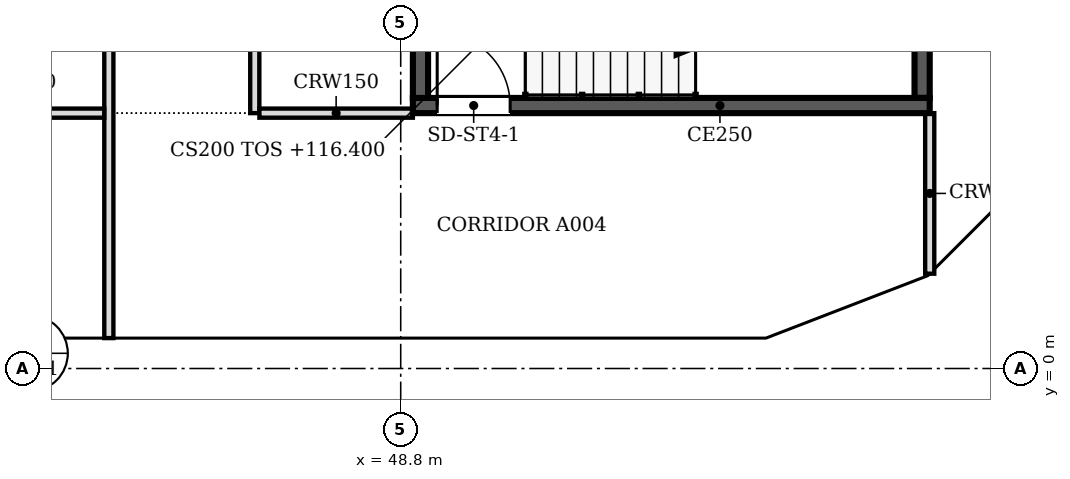
"""IFC4 building model, lengths in metres.
Left out: names, types, materials, properties, quantities, classifications, styles, units other than length and angle.
Written with IfcOpenShell. Run it as: python <this file> out.ifc"""

import sys

from ifc_helpers import new_model, si_unit, direction, frame, frame_2d, origin, place, context, subcontext, project, spatial, polyline, rectangle, outline, extrude, faceted_brep, source, transform, mapped, element, fill, save


model = new_model("IFC4")
c1 = context("Model", 3, precision=1e-05, world=origin(), true_north=direction((0.0, 1.0)))
c2 = subcontext(c1, "Body", "Model", "MODEL_VIEW")
j1 = project(units=[si_unit("LENGTHUNIT", "METRE"), si_unit("PLANEANGLEUNIT", "RADIAN")], contexts=[c1])
p1 = place(None, origin())
s1 = spatial("IfcSite", under=j1, at=p1, CompositionType="ELEMENT")
p2 = place(p1, origin())
s2 = spatial("IfcBuilding", under=s1, at=p2, CompositionType="ELEMENT")
p3 = place(p2, frame((0.0, 0.0, 116.4)))
s3 = spatial("IfcBuildingStorey", under=s2, at=p3, CompositionType="ELEMENT", Elevation=116.4)
m1 = source(origin(), c2, "Body", "SweptSolid", [
    extrude(outline(polyline([(3.05, 0.0), (6.1, 3.8), (3.05, 7.6), (0.0, 3.8), (3.05, 0.0)])), frame((0.0, 0.25, 0.0), z_axis=(0.0, -1.0, 0.0), x_axis=(1.0, 0.0, 0.0)), (0.0, 0.0, 1.0), 0.5),
])
p4 = place(p3, frame((42.7, 0.25, -3.8), z_axis=(0.0, 0.0, 1.0), x_axis=(1.0, 0.0, 0.0)))
e1 = element("IfcWall", 1, at=p4, inside=s3, PredefinedType="SOLIDWALL", context=c2, shape_type="MappedRepresentation", body=[
    mapped(m1, transform((0.0, 0.0, 0.0), scale=1.0)),
])
m2 = source(origin(), c2, "Body", "SweptSolid", [
    extrude(outline(polyline([(3.05, 0.399), (5.78, 3.8), (3.05, 7.2), (0.321, 3.8), (3.05, 0.399)])), frame((0.0, 0.26, 0.0), z_axis=(0.0, -1.0, 0.0), x_axis=(1.0, 0.0, 0.0)), (0.0, 0.0, 1.0), 0.52),
])
p5 = place(p4, origin())
e2 = element("IfcOpeningElement", 2, at=p5, cuts=e1, PredefinedType="OPENING", context=c2, shape_type="MappedRepresentation", body=[
    mapped(m2, transform((0.0, 0.0, 0.0), scale=1.0)),
])
m3 = source(origin(), c2, "Body", "Brep", [
    faceted_brep([(3.05, -0.25, 0.0), (6.053, -0.25, 3.8), (3.05, -0.25, 7.6), (0.0, -0.25, 3.8), (0.0, 0.25, 3.8), (3.05, 0.25, 7.6), (6.007, 0.25, 3.859), (6.007, 0.25, 3.741), (3.05, 0.25, 0.0), (6.053, 0.0, 3.8)], [[[0, 1, 2, 3]], [[4, 5, 6, 7, 8]], [[8, 7, 9, 1, 0]], [[6, 5, 2, 1, 9]], [[5, 4, 3, 2]], [[4, 8, 0, 3]], [[9, 7, 6]]]),
])
p6 = place(p3, frame((48.8, 0.25, -3.8), z_axis=(0.0, 0.0, 1.0), x_axis=(1.0, 0.0, 0.0)))
e3 = element("IfcWall", 3, at=p6, inside=s3, PredefinedType="SOLIDWALL", context=c2, shape_type="MappedRepresentation", body=[
    mapped(m3, transform((0.0, 0.0, 0.0), scale=1.0)),
])
m4 = source(origin(), c2, "Body", "SweptSolid", [
    extrude(outline(polyline([(3.049, 0.401), (5.735, 3.8), (3.049, 7.199), (0.321, 3.8), (3.049, 0.401)])), frame((0.0, 0.26, 0.0), z_axis=(0.0, -1.0, 0.0), x_axis=(1.0, 0.0, 0.0)), (0.0, 0.0, 1.0), 0.52),
])
p7 = place(p6, origin())
e4 = element("IfcOpeningElement", 4, at=p7, cuts=e3, PredefinedType="OPENING", context=c2, shape_type="MappedRepresentation", body=[
    mapped(m4, transform((0.0, 0.0, 0.0), scale=1.0)),
])
m5 = source(origin(), c2, "Body", "Brep", [
    faceted_brep([(2.95, -0.25, 0.0), (3.003, -0.25, 0.068), (3.003, -0.25, 7.531), (2.95, -0.25, 7.6), (0.0, -0.25, 3.8), (0.047, 0.25, 3.86), (2.898, 0.25, 7.532), (2.898, 0.25, 0.068), (0.047, 0.25, 3.74), (2.95, 0.0, 0.0), (2.95, 0.0, 7.6), (0.0, 0.0, 3.8)], [[[0, 1, 2, 3, 4]], [[5, 6, 7, 8]], [[1, 0, 9]], [[10, 3, 2]], [[6, 5, 11, 4, 3, 10]], [[8, 7, 9, 0, 4, 11]], [[8, 11, 5]], [[1, 9, 7, 6, 10, 2]]]),
])
p8 = place(p3, frame((54.854, 0.25, -3.8), z_axis=(0.0, 0.0, 1.0), x_axis=(0.932970071518, 0.359953949349, 0.0)))
e5 = element("IfcWall", 5, at=p8, inside=s3, PredefinedType="SOLIDWALL", context=c2, shape_type="MappedRepresentation", body=[
    mapped(m5, transform((0.0, 0.0, 0.0), scale=1.0)),
])
m6 = source(origin(), c2, "Body", "SweptSolid", [
    extrude(outline(polyline([(2.75, 6.935), (0.316, 3.8), (2.75, 0.665), (2.75, 6.935)])), frame((0.0, 0.26, 0.0), z_axis=(0.0, -1.0, 0.0), x_axis=(1.0, 0.0, 0.0)), (0.0, 0.0, 1.0), 0.52),
])
p9 = place(p8, origin())
e6 = element("IfcOpeningElement", 6, at=p9, cuts=e5, PredefinedType="OPENING", context=c2, shape_type="MappedRepresentation", body=[
    mapped(m6, transform((0.0, 0.0, 0.0), scale=1.0)),
])
m7 = source(origin(), c2, "Body", "Brep", [
    faceted_brep([(0.053, -0.25, 0.0), (2.997, -0.25, 3.8), (0.053, -0.25, 7.6), (0.0, -0.25, 7.532), (0.0, -0.25, 0.068), (0.106, 0.25, 7.531), (2.944, 0.25, 3.868), (2.944, 0.25, 3.732), (0.106, 0.25, 0.068), (2.997, 0.0, 3.8), (0.053, 0.0, 0.0), (0.053, 0.0, 7.6)], [[[0, 1, 2, 3, 4]], [[5, 6, 7, 8]], [[8, 7, 9, 1, 0, 10]], [[6, 5, 11, 2, 1, 9]], [[3, 2, 11]], [[10, 0, 4]], [[8, 10, 4, 3, 11, 5]], [[9, 7, 6]]]),
])
p10 = place(p3, frame((57.569, 1.274, -3.8), z_axis=(0.0, 0.0, 1.0), x_axis=(0.707066050402, 0.707147509625, 0.0)))
e7 = element("IfcWall", 7, at=p10, inside=s3, PredefinedType="SOLIDWALL", context=c2, shape_type="MappedRepresentation", body=[
    mapped(m7, transform((0.0, 0.0, 0.0), scale=1.0)),
])
m8 = source(origin(), c2, "Body", "SweptSolid", [
    extrude(outline(polyline([(0.253, 0.666), (2.681, 3.8), (0.253, 6.934), (0.253, 0.666)])), frame((0.0, 0.26, 0.0), z_axis=(0.0, -1.0, 0.0), x_axis=(1.0, 0.0, 0.0)), (0.0, 0.0, 1.0), 0.52),
])
p11 = place(p10, origin())
e8 = element("IfcOpeningElement", 8, at=p11, cuts=e7, PredefinedType="OPENING", context=c2, shape_type="MappedRepresentation", body=[
    mapped(m8, transform((0.0, 0.0, 0.0), scale=1.0)),
])
p12 = place(p2, frame((0.0, 0.0, 120.2)))
s4 = spatial("IfcBuildingStorey", under=s2, at=p12, CompositionType="ELEMENT", Elevation=120.2)
m9 = source(origin(), c2, "Body", "SweptSolid", [
    extrude(outline(polyline([(3.05, 0.0), (6.1, 3.8), (3.05, 7.6), (0.0, 3.8), (3.05, 0.0)])), frame((0.0, 0.25, 0.0), z_axis=(0.0, -1.0, 0.0), x_axis=(1.0, 0.0, 0.0)), (0.0, 0.0, 1.0), 0.5),
])
p13 = place(p12, frame((39.65, 0.25, -3.8), z_axis=(0.0, 0.0, 1.0), x_axis=(1.0, 0.0, 0.0)))
e9 = element("IfcWall", 9, at=p13, inside=s4, PredefinedType="SOLIDWALL", context=c2, shape_type="MappedRepresentation", body=[
    mapped(m9, transform((0.0, 0.0, 0.0), scale=1.0)),
])
m10 = source(origin(), c2, "Body", "SweptSolid", [
    extrude(outline(polyline([(3.05, 0.399), (5.78, 3.8), (3.05, 7.201), (0.321, 3.8), (3.05, 0.399)])), frame((0.0, 0.26, 0.0), z_axis=(0.0, -1.0, 0.0), x_axis=(1.0, 0.0, 0.0)), (0.0, 0.0, 1.0), 0.52),
])
p14 = place(p13, origin())
e10 = element("IfcOpeningElement", 10, at=p14, cuts=e9, PredefinedType="OPENING", context=c2, shape_type="MappedRepresentation", body=[
    mapped(m10, transform((0.0, 0.0, 0.0), scale=1.0)),
])
p15 = place(p12, frame((45.75, 0.25, -3.8), z_axis=(0.0, 0.0, 1.0), x_axis=(1.0, 0.0, 0.0)))
e11 = element("IfcWall", 11, at=p15, inside=s4, PredefinedType="SOLIDWALL", context=c2, shape_type="MappedRepresentation", body=[
    mapped(m9, transform((0.0, 0.0, 0.0), scale=1.0)),
])
p16 = place(p15, origin())
e12 = element("IfcOpeningElement", 12, at=p16, cuts=e11, PredefinedType="OPENING", context=c2, shape_type="MappedRepresentation", body=[
    mapped(m10, transform((0.0, 0.0, 0.0), scale=1.0)),
])
m11 = source(origin(), c2, "Body", "Brep", [
    faceted_brep([(3.003, -0.25, 0.0), (3.05, -0.25, 0.06), (3.05, -0.25, 7.54), (3.003, -0.25, 7.6), (0.0, -0.25, 3.8), (0.0, 0.25, 3.8), (2.957, 0.25, 7.541), (2.957, 0.25, 0.059), (3.003, 0.0, 0.0), (3.003, 0.0, 7.6)], [[[0, 1, 2, 3, 4]], [[5, 6, 7]], [[1, 0, 8]], [[9, 3, 2]], [[6, 5, 4, 3, 9]], [[5, 7, 8, 0, 4]], [[1, 8, 7, 6, 9, 2]]]),
])
p17 = place(p12, frame((51.85, 0.25, -3.8), z_axis=(0.0, 0.0, 1.0), x_axis=(1.0, 0.0, 0.0)))
e13 = element("IfcWall", 13, at=p17, inside=s4, PredefinedType="SOLIDWALL", context=c2, shape_type="MappedRepresentation", body=[
    mapped(m11, transform((0.0, 0.0, 0.0), scale=1.0)),
])
m12 = source(origin(), c2, "Body", "SweptSolid", [
    extrude(outline(polyline([(2.803, 6.944), (0.319, 3.8), (2.803, 0.656), (2.803, 6.944)])), frame((0.0, 0.26, 0.0), z_axis=(0.0, -1.0, 0.0), x_axis=(1.0, 0.0, 0.0)), (0.0, 0.0, 1.0), 0.52),
])
p18 = place(p17, origin())
e14 = element("IfcOpeningElement", 14, at=p18, cuts=e13, PredefinedType="OPENING", context=c2, shape_type="MappedRepresentation", body=[
    mapped(m12, transform((0.0, 0.0, 0.0), scale=1.0)),
])
m13 = source(origin(), c2, "Body", "Brep", [
    faceted_brep([(0.047, -0.25, 0.0), (2.997, -0.25, 3.8), (0.047, -0.25, 7.6), (0.0, -0.25, 7.541), (0.0, -0.25, 0.059), (0.093, 0.25, 7.54), (2.944, 0.25, 3.868), (2.944, 0.25, 3.732), (0.093, 0.25, 0.06), (2.997, 0.0, 3.8), (0.047, 0.0, 0.0), (0.047, 0.0, 7.6)], [[[0, 1, 2, 3, 4]], [[5, 6, 7, 8]], [[8, 7, 9, 1, 0, 10]], [[6, 5, 11, 2, 1, 9]], [[3, 2, 11]], [[10, 0, 4]], [[8, 10, 4, 3, 11, 5]], [[9, 7, 6]]]),
])
p19 = place(p12, frame((54.81, 0.233, -3.8), z_axis=(0.0, 0.0, 1.0), x_axis=(0.932990326376, 0.359901446078, 0.0)))
e15 = element("IfcWall", 15, at=p19, inside=s4, PredefinedType="SOLIDWALL", context=c2, shape_type="MappedRepresentation", body=[
    mapped(m13, transform((0.0, 0.0, 0.0), scale=1.0)),
])
m14 = source(origin(), c2, "Body", "SweptSolid", [
    extrude(outline(polyline([(0.247, 0.665), (2.681, 3.8), (0.247, 6.935), (0.247, 0.665)])), frame((0.0, 0.26, 0.0), z_axis=(0.0, -1.0, 0.0), x_axis=(1.0, 0.0, 0.0)), (0.0, 0.0, 1.0), 0.52),
])
p20 = place(p19, origin())
e16 = element("IfcOpeningElement", 16, at=p20, cuts=e15, PredefinedType="OPENING", context=c2, shape_type="MappedRepresentation", body=[
    mapped(m14, transform((0.0, 0.0, 0.0), scale=1.0)),
])
m15 = source(origin(), c2, "Body", "Brep", [
    faceted_brep([(2.944, -0.25, 0.0), (2.997, -0.25, 0.068), (2.997, -0.25, 7.532), (2.944, -0.25, 7.6), (0.0, -0.25, 3.8), (0.053, 0.25, 3.868), (2.891, 0.25, 7.532), (2.891, 0.25, 0.068), (0.053, 0.25, 3.732), (2.944, 0.0, 0.0), (2.944, 0.0, 7.6), (0.0, 0.0, 3.8)], [[[0, 1, 2, 3, 4]], [[5, 6, 7, 8]], [[1, 0, 9]], [[10, 3, 2]], [[6, 5, 11, 4, 3, 10]], [[8, 7, 9, 0, 4, 11]], [[8, 11, 5]], [[1, 9, 7, 6, 10, 2]]]),
])
p21 = place(p12, frame((57.606, 1.312, -3.8), z_axis=(0.0, 0.0, 1.0), x_axis=(0.707147509625, 0.707066050402, 0.0)))
e17 = element("IfcWall", 17, at=p21, inside=s4, PredefinedType="SOLIDWALL", context=c2, shape_type="MappedRepresentation", body=[
    mapped(m15, transform((0.0, 0.0, 0.0), scale=1.0)),
])
m16 = source(origin(), c2, "Body", "SweptSolid", [
    extrude(outline(polyline([(2.744, 6.934), (0.316, 3.8), (2.744, 0.667), (2.744, 6.934)])), frame((0.0, 0.26, 0.0), z_axis=(0.0, -1.0, 0.0), x_axis=(1.0, 0.0, 0.0)), (0.0, 0.0, 1.0), 0.52),
])
p22 = place(p21, origin())
e18 = element("IfcOpeningElement", 18, at=p22, cuts=e17, PredefinedType="OPENING", context=c2, shape_type="MappedRepresentation", body=[
    mapped(m16, transform((0.0, 0.0, 0.0), scale=1.0)),
])
p23 = place(p3, frame((57.5, 4.325, 0.0), z_axis=(0.0, 0.0, 1.0), x_axis=(-1.0, 0.0, 0.0)))
e19 = element("IfcWall", 19, at=p23, inside=s3, PredefinedType="SOLIDWALL", context=c2, shape_type="SweptSolid", body=[
    extrude(rectangle(XDim=8.5, YDim=0.25, at=frame_2d((4.25, 0.0))), origin(), (0.0, 0.0, 1.0), 3.8),
])
m17 = source(origin(), c2, "Body", "SweptSolid", [
    extrude(rectangle(XDim=1.2, YDim=2.1, at=frame_2d((0.6, 1.05))), frame((0.0, 0.135, 0.0), z_axis=(0.0, -1.0, 0.0), x_axis=(1.0, 0.0, 0.0)), (0.0, 0.0, 1.0), 0.27),
])
p24 = place(p23, frame((6.9, 0.0, 0.0)))
e20 = element("IfcOpeningElement", 20, at=p24, cuts=e19, PredefinedType="OPENING", context=c2, shape_type="MappedRepresentation", body=[
    mapped(m17, transform((0.0, 0.0, 0.0), scale=1.0)),
])
for number, where, z_axis, x_axis in (
    (21, (49.125, 4.45, 0.0), (0.0, 0.0, 1.0), (0.0, 1.0, 0.0)),
    (22, (57.375, 7.85, 0.0), (0.0, 0.0, 1.0), (0.0, -1.0, 0.0)),
):
    element("IfcWall", number, at=place(p3, frame(where, z_axis=z_axis, x_axis=x_axis)), inside=s3, PredefinedType="SOLIDWALL", context=c2, shape_type="SweptSolid", body=[
        extrude(rectangle(XDim=3.4, YDim=0.25, at=frame_2d((1.7, 0.0))), origin(), (0.0, 0.0, 1.0), 3.8),
    ])
p25 = place(p3, frame((44.0, 0.5, 0.0), z_axis=(0.0, 0.0, 1.0), x_axis=(0.0, 1.0, 0.0)))
e23 = element("IfcWall", 23, at=p25, inside=s3, PredefinedType="PARTITIONING", context=c2, shape_type="SweptSolid", body=[
    extrude(rectangle(XDim=21.424, YDim=0.15, at=frame_2d((10.712, 0.0))), origin(), (0.0, 0.0, 1.0), 3.067),
])
m18 = source(origin(), c2, "Body", "SweptSolid", [
    extrude(rectangle(XDim=0.9, YDim=2.1, at=frame_2d((0.45, 1.05))), frame((0.0, 0.085, 0.0), z_axis=(0.0, -1.0, 0.0), x_axis=(1.0, 0.0, 0.0)), (0.0, 0.0, 1.0), 0.17),
])
p26 = place(p25, frame((16.601, 0.0, 0.0)))
e24 = element("IfcOpeningElement", 24, at=p26, cuts=e23, PredefinedType="OPENING", context=c2, shape_type="MappedRepresentation", body=[
    mapped(m18, transform((0.0, 0.0, 0.0), scale=1.0)),
])
m19 = source(origin(), c2, "Body", "SweptSolid", [
    extrude(rectangle(XDim=1.0, YDim=2.1, at=frame_2d((0.5, 1.05))), frame((0.0, 0.085, 0.0), z_axis=(0.0, -1.0, 0.0), x_axis=(1.0, 0.0, 0.0)), (0.0, 0.0, 1.0), 0.17),
])
p27 = place(p25, frame((7.7, 0.0, 0.0)))
e25 = element("IfcOpeningElement", 25, at=p27, cuts=e23, PredefinedType="OPENING", context=c2, shape_type="MappedRepresentation", body=[
    mapped(m19, transform((0.0, 0.0, 0.0), scale=1.0)),
])
p28 = place(p3, frame((57.5, 1.559, 0.0), z_axis=(0.0, 0.0, 1.0), x_axis=(0.0, 1.0, 0.0)))
e26 = element("IfcWall", 26, at=p28, inside=s3, PredefinedType="PARTITIONING", context=c2, shape_type="SweptSolid", body=[
    extrude(rectangle(XDim=2.641, YDim=0.15, at=frame_2d((1.32, 0.0))), origin(), (0.0, 0.0, 1.0), 3.067),
])
p29 = place(p3, frame((40.951, 4.2, 0.0), z_axis=(0.0, 0.0, 1.0), x_axis=(1.0, 0.0, 0.0)))
e27 = element("IfcWall", 27, at=p29, inside=s3, PredefinedType="PARTITIONING", context=c2, shape_type="SweptSolid", body=[
    extrude(rectangle(XDim=2.973, YDim=0.15, at=frame_2d((1.487, 0.0))), origin(), (0.0, 0.0, 1.0), 3.067),
])
p30 = place(p3, frame((46.4, 21.924, 0.0), z_axis=(0.0, 0.0, 1.0), x_axis=(0.0, -1.0, 0.0)))
e28 = element("IfcWall", 28, at=p30, inside=s3, PredefinedType="PARTITIONING", context=c2, shape_type="SweptSolid", body=[
    extrude(rectangle(XDim=17.724, YDim=0.15, at=frame_2d((8.862, 0.0))), origin(), (0.0, 0.0, 1.0), 3.067),
])
p31 = place(p30, frame((3.423, 0.0, 0.0)))
e29 = element("IfcOpeningElement", 29, at=p31, cuts=e28, PredefinedType="OPENING", context=c2, shape_type="MappedRepresentation", body=[
    mapped(m19, transform((0.0, 0.0, 0.0), scale=1.0)),
])
p32 = place(p30, frame((12.324, 0.0, 0.0)))
e30 = element("IfcOpeningElement", 30, at=p32, cuts=e28, PredefinedType="OPENING", context=c2, shape_type="MappedRepresentation", body=[
    mapped(m18, transform((0.0, 0.0, 0.0), scale=1.0)),
])
p33 = place(p3, frame((46.476, 4.2, 0.0), z_axis=(0.0, 0.0, 1.0), x_axis=(1.0, 0.0, 0.0)))
e31 = element("IfcWall", 31, at=p33, inside=s3, PredefinedType="PARTITIONING", context=c2, shape_type="SweptSolid", body=[
    extrude(rectangle(XDim=2.524, YDim=0.15, at=frame_2d((1.262, 0.0))), origin(), (0.0, 0.0, 1.0), 3.067),
])
m20 = source(origin(), c2, "Body", "SweptSolid", [
    extrude(rectangle(XDim=1.2, YDim=2.1, at=frame_2d((0.6, 1.05))), frame((0.0, 0.025, 0.0), z_axis=(0.0, -1.0, 0.0), x_axis=(1.0, 0.0, 0.0)), (0.0, 0.0, 1.0), 0.05),
])
p34 = place(p24, origin())
e32 = element("IfcDoor", 32, at=p34, inside=s3, OperationType="SINGLE_SWING_RIGHT", PredefinedType="DOOR", context=c2, shape_type="MappedRepresentation", body=[
    mapped(m20, transform((0.0, 0.0, 0.0), scale=1.0)),
])
fill(e20, e32)
save(model, sys.argv[1])
